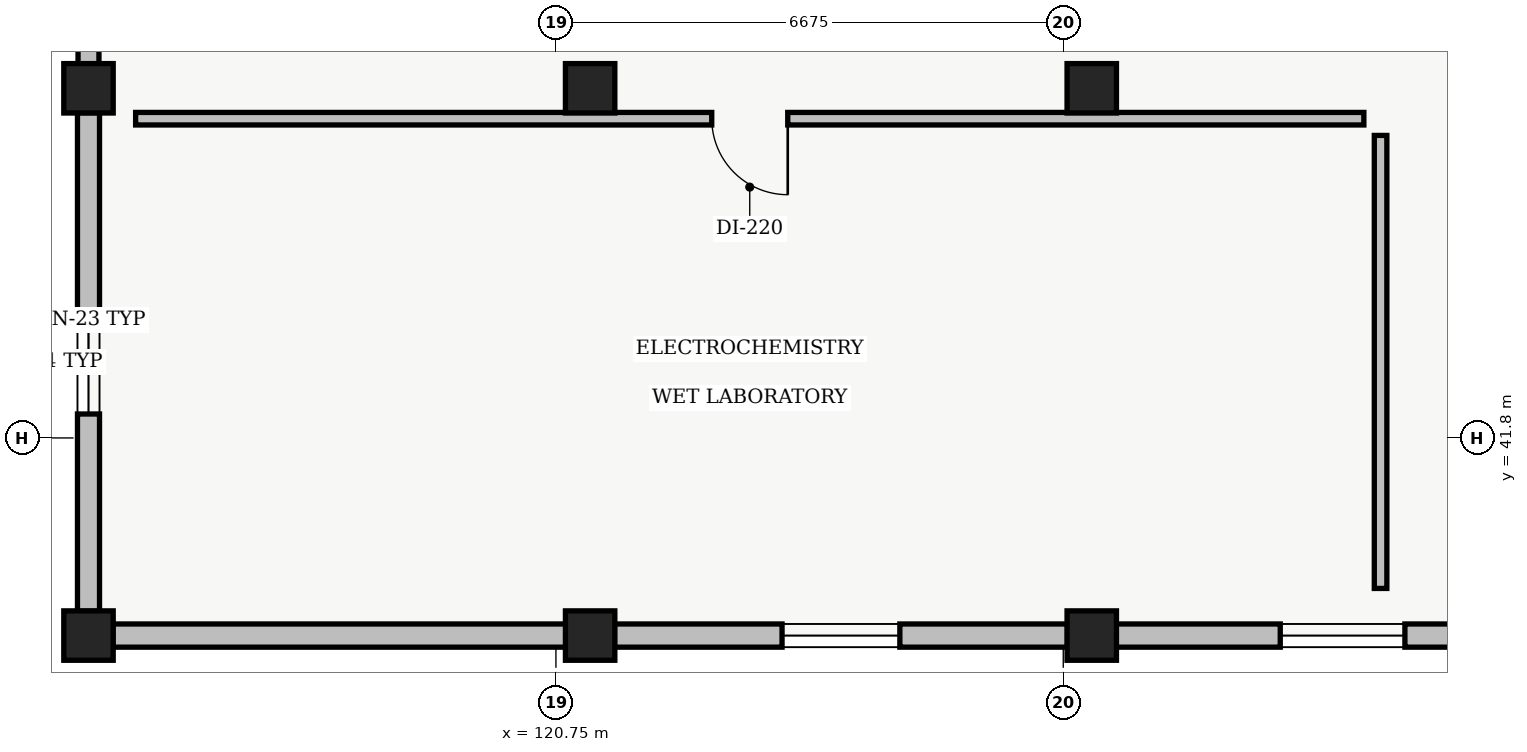
"""IFC4 building model, lengths in metres.
Left out: names, types, materials, properties, quantities, classifications, styles, units other than length and angle.
Written with IfcOpenShell. Run it as: python <this file> out.ifc"""

import sys

from ifc_helpers import new_model, si_unit, direction, frame, frame_2d, origin, origin_2d, place, context, subcontext, project, spatial, rectangle, extrude, element, fill, save


model = new_model("IFC4")
c1 = context("Model", 3, precision=1e-05, world=origin(), true_north=direction((0.0, 1.0)))
c2 = subcontext(c1, "Body", "Model", "MODEL_VIEW")
j1 = project(units=[si_unit("LENGTHUNIT", "METRE"), si_unit("PLANEANGLEUNIT", "RADIAN")], contexts=[c1])
p1 = place(None, origin())
s1 = spatial("IfcSite", under=j1, at=p1, CompositionType="ELEMENT")
p2 = place(p1, origin())
s2 = spatial("IfcBuilding", under=s1, at=p2, CompositionType="ELEMENT")
p3 = place(p2, frame((0.0, 0.0, 14.1)))
s3 = spatial("IfcBuildingStorey", under=s2, at=p3, CompositionType="ELEMENT", Elevation=14.1)
for number, where, z_axis, x_axis in (
    (1, (114.6, 39.2, 0.0), (0.0, 0.0, 1.0), (1.0, 0.0, 0.0)),
    (2, (114.6, 46.4, 0.0), (0.0, 0.0, 1.0), (1.0, 0.0, 0.0)),
    (3, (121.2, 39.2, 0.0), (0.0, 0.0, 1.0), (1.0, 0.0, 0.0)),
    (4, (121.2, 46.4, 0.0), (0.0, 0.0, 1.0), (1.0, 0.0, 0.0)),
    (5, (127.8, 39.2, 0.0), (0.0, 0.0, 1.0), (1.0, 0.0, 0.0)),
    (6, (127.8, 46.4, 0.0), (0.0, 0.0, 1.0), (1.0, 0.0, 0.0)),
):
    element("IfcColumn", number, at=place(p3, frame(where, z_axis=z_axis, x_axis=x_axis)), inside=s3, PredefinedType="COLUMN", context=c2, shape_type="SweptSolid", body=[
        extrude(rectangle(XDim=0.65, YDim=0.65, at=origin_2d()), origin(), (0.0, 0.0, 1.0), 4.29),
    ])
p4 = place(p3, frame((114.6, 39.52, 0.0), z_axis=(0.0, 0.0, 1.0), x_axis=(0.0, 1.0, 0.0)))
e7 = element("IfcWall", 7, at=p4, inside=s3, PredefinedType="STANDARD", context=c2, shape_type="SweptSolid", body=[
    extrude(rectangle(XDim=6.56, YDim=0.29, at=frame_2d((3.28, 0.0))), origin(), (0.0, 0.0, 1.0), 3.775),
])
p5 = place(p4, frame((2.595, 0.0, 0.95)))
e8 = element("IfcOpeningElement", 8, at=p5, cuts=e7, PredefinedType="OPENING", context=c2, shape_type="SweptSolid", body=[
    extrude(rectangle(XDim=1.37, YDim=1.42, at=frame_2d((0.685, 0.71))), frame((0.0, 0.145, 0.0), z_axis=(0.0, -1.0, 0.0), x_axis=(1.0, 0.0, 0.0)), (0.0, 0.0, 1.0), 0.29),
])
p6 = place(p3, frame((114.6, 46.72, 0.0), z_axis=(0.0, 0.0, 1.0), x_axis=(0.0, 1.0, 0.0)))
e9 = element("IfcWall", 9, at=p6, inside=s3, PredefinedType="STANDARD", context=c2, shape_type="SweptSolid", body=[
    extrude(rectangle(XDim=6.56, YDim=0.275, at=frame_2d((3.28, 0.0))), origin(), (0.0, 0.0, 1.0), 3.775),
])
p7 = place(p6, frame((2.55, 0.0, 0.95)))
e10 = element("IfcOpeningElement", 10, at=p7, cuts=e9, PredefinedType="OPENING", context=c2, shape_type="SweptSolid", body=[
    extrude(rectangle(XDim=1.46, YDim=1.44, at=frame_2d((0.73, 0.72))), frame((0.0, 0.137, 0.0), z_axis=(0.0, -1.0, 0.0), x_axis=(1.0, 0.0, 0.0)), (0.0, 0.0, 1.0), 0.275),
])
p8 = place(p3, frame((134.08, 39.2, 0.0), z_axis=(0.0, 0.0, 1.0), x_axis=(-1.0, 0.0, 0.0)))
e11 = element("IfcWall", 11, at=p8, inside=s3, PredefinedType="STANDARD", context=c2, shape_type="SweptSolid", body=[
    extrude(rectangle(XDim=5.96, YDim=0.305, at=frame_2d((2.98, 0.0))), origin(), (0.0, 0.0, 1.0), 3.775),
])
p9 = place(p8, frame((2.16, 0.0, 0.95)))
e12 = element("IfcOpeningElement", 12, at=p9, cuts=e11, PredefinedType="OPENING", context=c2, shape_type="SweptSolid", body=[
    extrude(rectangle(XDim=1.64, YDim=1.48, at=frame_2d((0.82, 0.74))), frame((0.0, 0.152, 0.0), z_axis=(0.0, -1.0, 0.0), x_axis=(1.0, 0.0, 0.0)), (0.0, 0.0, 1.0), 0.305),
])
p10 = place(p3, frame((127.48, 39.2, 0.0), z_axis=(0.0, 0.0, 1.0), x_axis=(-1.0, 0.0, 0.0)))
e13 = element("IfcWall", 13, at=p10, inside=s3, PredefinedType="STANDARD", context=c2, shape_type="SweptSolid", body=[
    extrude(rectangle(XDim=5.96, YDim=0.305, at=frame_2d((2.98, 0.0))), origin(), (0.0, 0.0, 1.0), 3.775),
])
p11 = place(p10, frame((2.205, 0.0, 0.95)))
e14 = element("IfcOpeningElement", 14, at=p11, cuts=e13, PredefinedType="OPENING", context=c2, shape_type="SweptSolid", body=[
    extrude(rectangle(XDim=1.55, YDim=1.46, at=frame_2d((0.775, 0.73))), frame((0.0, 0.152, 0.0), z_axis=(0.0, -1.0, 0.0), x_axis=(1.0, 0.0, 0.0)), (0.0, 0.0, 1.0), 0.305),
])
p12 = place(p3, frame((120.88, 39.2, 0.0), z_axis=(0.0, 0.0, 1.0), x_axis=(-1.0, 0.0, 0.0)))
e15 = element("IfcWall", 15, at=p12, inside=s3, PredefinedType="STANDARD", context=c2, shape_type="SweptSolid", body=[
    extrude(rectangle(XDim=5.96, YDim=0.305, at=frame_2d((2.98, 0.0))), origin(), (0.0, 0.0, 1.0), 3.775),
])
p13 = place(p3, frame((131.6, 39.82, 0.0), z_axis=(0.0, 0.0, 1.0), x_axis=(0.0, 1.0, 0.0)))
e16 = element("IfcWall", 16, at=p13, inside=s3, PredefinedType="PARTITIONING", context=c2, shape_type="SweptSolid", body=[
    extrude(rectangle(XDim=5.96, YDim=0.165, at=frame_2d((2.98, 0.0))), origin(), (0.0, 0.0, 1.0), 3.95),
])
p14 = place(p3, frame((131.38, 46.0, 0.0), z_axis=(0.0, 0.0, 1.0), x_axis=(-1.0, 0.0, 0.0)))
e17 = element("IfcWall", 17, at=p14, inside=s3, PredefinedType="PARTITIONING", context=c2, shape_type="SweptSolid", body=[
    extrude(rectangle(XDim=16.16, YDim=0.165, at=frame_2d((8.08, 0.0))), origin(), (0.0, 0.0, 1.0), 3.95),
])
p15 = place(p14, frame((7.58, 0.0, 0.0)))
e18 = element("IfcOpeningElement", 18, at=p15, cuts=e17, PredefinedType="OPENING", context=c2, shape_type="SweptSolid", body=[
    extrude(rectangle(XDim=1.0, YDim=2.14, at=frame_2d((0.5, 1.07))), frame((0.0, 0.083, 0.0), z_axis=(0.0, -1.0, 0.0), x_axis=(1.0, 0.0, 0.0)), (0.0, 0.0, 1.0), 0.165),
])
p16 = place(p5, origin())
e19 = element("IfcWindow", 19, at=p16, inside=s3, PartitioningType="SINGLE_PANEL", PredefinedType="WINDOW", context=c2, shape_type="SweptSolid", body=[
    extrude(rectangle(XDim=1.37, YDim=1.42, at=frame_2d((0.685, 0.71))), frame((0.0, 0.03, 0.0), z_axis=(0.0, -1.0, 0.0), x_axis=(1.0, 0.0, 0.0)), (0.0, 0.0, 1.0), 0.06),
])
fill(e8, e19)
p17 = place(p9, origin())
e20 = element("IfcWindow", 20, at=p17, inside=s3, PartitioningType="SINGLE_PANEL", PredefinedType="WINDOW", context=c2, shape_type="SweptSolid", body=[
    extrude(rectangle(XDim=1.64, YDim=1.48, at=frame_2d((0.82, 0.74))), frame((0.0, 0.03, 0.0), z_axis=(0.0, -1.0, 0.0), x_axis=(1.0, 0.0, 0.0)), (0.0, 0.0, 1.0), 0.06),
])
fill(e12, e20)
p18 = place(p11, origin())
e21 = element("IfcWindow", 21, at=p18, inside=s3, PartitioningType="SINGLE_PANEL", PredefinedType="WINDOW", context=c2, shape_type="SweptSolid", body=[
    extrude(rectangle(XDim=1.55, YDim=1.46, at=frame_2d((0.775, 0.73))), frame((0.0, 0.03, 0.0), z_axis=(0.0, -1.0, 0.0), x_axis=(1.0, 0.0, 0.0)), (0.0, 0.0, 1.0), 0.06),
])
fill(e14, e21)
p19 = place(p15, origin())
e22 = element("IfcDoor", 22, at=p19, inside=s3, OperationType="SINGLE_SWING_LEFT", PredefinedType="DOOR", context=c2, shape_type="SweptSolid", body=[
    extrude(rectangle(XDim=1.0, YDim=2.14, at=frame_2d((0.5, 1.07))), frame((0.0, 0.025, 0.0), z_axis=(0.0, -1.0, 0.0), x_axis=(1.0, 0.0, 0.0)), (0.0, 0.0, 1.0), 0.05),
])
fill(e18, e22)
save(model, sys.argv[1])
